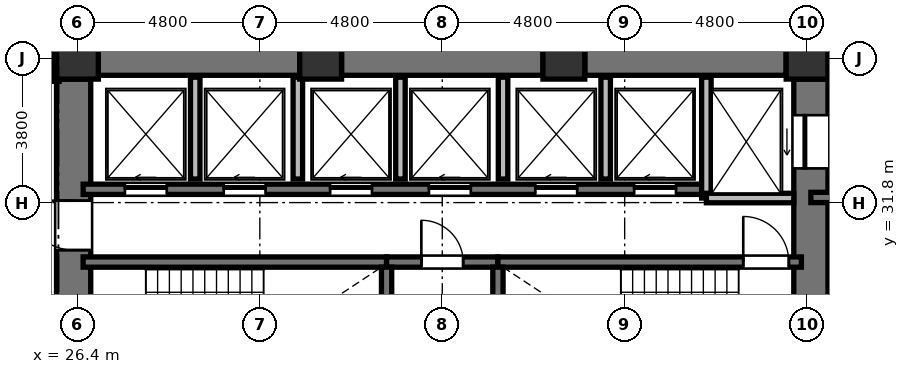
"""IFC4 building model, lengths in metres.
Left out: names, types, materials, properties, quantities, classifications, styles, units other than length and angle.
Written with IfcOpenShell. Run it as: python <this file> out.ifc"""

import sys

from ifc_helpers import new_model, si_unit, direction, frame, frame_2d, origin, origin_2d, place, context, subcontext, project, spatial, rectangle, extrude, element, fill, save


model = new_model("IFC4")
c1 = context("Model", 3, precision=1e-05, world=origin(), true_north=direction((0.0, 1.0)))
c2 = subcontext(c1, "Body", "Model", "MODEL_VIEW")
j1 = project(units=[si_unit("LENGTHUNIT", "METRE"), si_unit("PLANEANGLEUNIT", "RADIAN")], contexts=[c1])
p1 = place(None, origin())
s1 = spatial("IfcSite", under=j1, at=p1, CompositionType="ELEMENT")
p2 = place(p1, origin())
s2 = spatial("IfcBuilding", under=s1, at=p2, CompositionType="ELEMENT")
p3 = place(p2, frame((0.0, 0.0, 58.032)))
s3 = spatial("IfcBuildingStorey", under=s2, at=p3, CompositionType="ELEMENT", Elevation=58.032)
for number, where, z_axis, x_axis in (
    (1, (45.6, 35.6, 0.0), (0.0, 0.0, 1.0), (1.0, 0.0, 0.0)),
    (2, (39.2, 35.6, 0.0), (0.0, 0.0, 1.0), (1.0, 0.0, 0.0)),
    (3, (32.8, 35.6, 0.0), (0.0, 0.0, 1.0), (1.0, 0.0, 0.0)),
    (4, (26.4, 35.6, 0.0), (0.0, 0.0, 1.0), (1.0, 0.0, 0.0)),
):
    element("IfcColumn", number, at=place(p3, frame(where, z_axis=z_axis, x_axis=x_axis)), inside=s3, PredefinedType="COLUMN", context=c2, shape_type="SweptSolid", body=[
        extrude(rectangle(XDim=1.1, YDim=1.1, at=origin_2d()), origin(), (0.0, 0.0, 1.0), 3.648),
    ])
p4 = place(p3, frame((26.3, 20.95, 0.0), z_axis=(0.0, 0.0, 1.0), x_axis=(0.0, 1.0, 0.0)))
e5 = element("IfcWall", 5, at=p4, inside=s3, PredefinedType="SHEAR", context=c2, shape_type="SweptSolid", body=[
    extrude(rectangle(XDim=14.1, YDim=0.9, at=frame_2d((7.05, 0.0))), origin(), (0.0, 0.0, 1.0), 3.648),
])
p5 = place(p4, frame((6.5, 0.0, 0.0)))
e6 = element("IfcOpeningElement", 6, at=p5, cuts=e5, PredefinedType="OPENING", context=c2, shape_type="SweptSolid", body=[
    extrude(rectangle(XDim=1.2, YDim=2.15, at=frame_2d((0.6, 1.075))), frame((0.0, 0.46, 0.0), z_axis=(0.0, -1.0, 0.0), x_axis=(1.0, 0.0, 0.0)), (0.0, 0.0, 1.0), 0.92),
])
p6 = place(p4, frame((9.6, 0.0, 0.0)))
e7 = element("IfcOpeningElement", 7, at=p6, cuts=e5, PredefinedType="OPENING", context=c2, shape_type="SweptSolid", body=[
    extrude(rectangle(XDim=1.3, YDim=2.2, at=frame_2d((0.65, 1.1))), frame((0.0, 0.46, 0.0), z_axis=(0.0, -1.0, 0.0), x_axis=(1.0, 0.0, 0.0)), (0.0, 0.0, 1.0), 0.92),
])
p7 = place(p4, frame((3.26, 0.0, 0.0)))
e8 = element("IfcOpeningElement", 8, at=p7, cuts=e5, PredefinedType="OPENING", context=c2, shape_type="SweptSolid", body=[
    extrude(rectangle(XDim=1.3, YDim=2.2, at=frame_2d((0.65, 1.1))), frame((0.0, 0.46, 0.0), z_axis=(0.0, -1.0, 0.0), x_axis=(1.0, 0.0, 0.0)), (0.0, 0.0, 1.0), 0.92),
])
p8 = place(p3, frame((45.7, 20.95, 0.0), z_axis=(0.0, 0.0, 1.0), x_axis=(0.0, 1.0, 0.0)))
e9 = element("IfcWall", 9, at=p8, inside=s3, PredefinedType="SHEAR", context=c2, shape_type="SweptSolid", body=[
    extrude(rectangle(XDim=14.1, YDim=0.9, at=frame_2d((7.05, 0.0))), origin(), (0.0, 0.0, 1.0), 3.648),
])
p9 = place(p8, frame((11.75, 0.0, 0.0)))
e10 = element("IfcOpeningElement", 10, at=p9, cuts=e9, PredefinedType="OPENING", context=c2, shape_type="SweptSolid", body=[
    extrude(rectangle(XDim=1.4, YDim=2.3, at=frame_2d((0.7, 1.15))), frame((0.0, 0.46, 0.0), z_axis=(0.0, -1.0, 0.0), x_axis=(1.0, 0.0, 0.0)), (0.0, 0.0, 1.0), 0.92),
])
p10 = place(p8, frame((0.95, 0.0, 0.0)))
e11 = element("IfcOpeningElement", 11, at=p10, cuts=e9, PredefinedType="OPENING", context=c2, shape_type="SweptSolid", body=[
    extrude(rectangle(XDim=1.4, YDim=2.3, at=frame_2d((0.7, 1.15))), frame((0.0, 0.46, 0.0), z_axis=(0.0, -1.0, 0.0), x_axis=(1.0, 0.0, 0.0)), (0.0, 0.0, 1.0), 0.92),
])
p11 = place(p3, frame((26.95, 35.6, 0.0), z_axis=(0.0, 0.0, 1.0), x_axis=(1.0, 0.0, 0.0)))
e12 = element("IfcWall", 12, at=p11, inside=s3, PredefinedType="SHEAR", context=c2, shape_type="SweptSolid", body=[
    extrude(rectangle(XDim=5.3, YDim=0.9, at=frame_2d((2.65, 0.0))), origin(), (0.0, 0.0, 1.0), 3.648),
])
p12 = place(p3, frame((33.35, 35.6, 0.0), z_axis=(0.0, 0.0, 1.0), x_axis=(1.0, 0.0, 0.0)))
e13 = element("IfcWall", 13, at=p12, inside=s3, PredefinedType="SHEAR", context=c2, shape_type="SweptSolid", body=[
    extrude(rectangle(XDim=5.3, YDim=0.9, at=frame_2d((2.65, 0.0))), origin(), (0.0, 0.0, 1.0), 3.648),
])
p13 = place(p3, frame((39.75, 35.6, 0.0), z_axis=(0.0, 0.0, 1.0), x_axis=(1.0, 0.0, 0.0)))
e14 = element("IfcWall", 14, at=p13, inside=s3, PredefinedType="SHEAR", context=c2, shape_type="SweptSolid", body=[
    extrude(rectangle(XDim=5.3, YDim=0.9, at=frame_2d((2.65, 0.0))), origin(), (0.0, 0.0, 1.0), 3.648),
])
p14 = place(p3, frame((26.55, 30.235, 0.0), z_axis=(0.0, 0.0, 1.0), x_axis=(1.0, 0.0, 0.0)))
e15 = element("IfcWall", 15, at=p14, inside=s3, PredefinedType="SHEAR", context=c2, shape_type="SweptSolid", body=[
    extrude(rectangle(XDim=7.985, YDim=0.27, at=frame_2d((3.992, 0.0))), origin(), (0.0, 0.0, 1.0), 3.648),
])
p15 = place(p3, frame((34.535, 30.235, 0.0), z_axis=(0.0, 0.0, 1.0), x_axis=(1.0, 0.0, 0.0)))
e16 = element("IfcWall", 16, at=p15, inside=s3, PredefinedType="SHEAR", context=c2, shape_type="SweptSolid", body=[
    extrude(rectangle(XDim=2.93, YDim=0.27, at=frame_2d((1.465, 0.0))), origin(), (0.0, 0.0, 1.0), 3.648),
])
p16 = place(p15, frame((0.915, 0.0, 0.0)))
e17 = element("IfcOpeningElement", 17, at=p16, cuts=e16, PredefinedType="OPENING", context=c2, shape_type="SweptSolid", body=[
    extrude(rectangle(XDim=1.1, YDim=2.15, at=frame_2d((0.55, 1.075))), frame((0.0, 0.145, 0.0), z_axis=(0.0, -1.0, 0.0), x_axis=(1.0, 0.0, 0.0)), (0.0, 0.0, 1.0), 0.29),
])
p17 = place(p3, frame((37.465, 30.235, 0.0), z_axis=(0.0, 0.0, 1.0), x_axis=(1.0, 0.0, 0.0)))
e18 = element("IfcWall", 18, at=p17, inside=s3, PredefinedType="SHEAR", context=c2, shape_type="SweptSolid", body=[
    extrude(rectangle(XDim=7.985, YDim=0.27, at=frame_2d((3.992, 0.0))), origin(), (0.0, 0.0, 1.0), 3.648),
])
p18 = place(p17, frame((6.455, 0.0, 0.0)))
e19 = element("IfcOpeningElement", 19, at=p18, cuts=e18, PredefinedType="OPENING", context=c2, shape_type="SweptSolid", body=[
    extrude(rectangle(XDim=1.2, YDim=2.15, at=frame_2d((0.6, 1.075))), frame((0.0, 0.145, 0.0), z_axis=(0.0, -1.0, 0.0), x_axis=(1.0, 0.0, 0.0)), (0.0, 0.0, 1.0), 0.29),
])
for number, where, z_axis, x_axis in (
    (20, (34.535, 26.02, 0.0), (0.0, 0.0, 1.0), (0.0, 1.0, 0.0)),
    (21, (37.465, 26.02, 0.0), (0.0, 0.0, 1.0), (0.0, 1.0, 0.0)),
):
    element("IfcWall", number, at=place(p3, frame(where, z_axis=z_axis, x_axis=x_axis)), inside=s3, PredefinedType="SHEAR", context=c2, shape_type="SweptSolid", body=[
        extrude(rectangle(XDim=4.08, YDim=0.27, at=frame_2d((2.04, 0.0))), origin(), (0.0, 0.0, 1.0), 3.648),
    ])
p19 = place(p3, frame((26.55, 32.15, 0.0), z_axis=(0.0, 0.0, 1.0), x_axis=(1.0, 0.0, 0.0)))
e22 = element("IfcWall", 22, at=p19, inside=s3, PredefinedType="SHEAR", context=c2, shape_type="SweptSolid", body=[
    extrude(rectangle(XDim=16.4, YDim=0.27, at=frame_2d((8.2, 0.0))), origin(), (0.0, 0.0, 1.0), 3.648),
])
p20 = place(p19, frame((1.1, 0.0, 0.0)))
e23 = element("IfcOpeningElement", 23, at=p20, cuts=e22, PredefinedType="OPENING", context=c2, shape_type="SweptSolid", body=[
    extrude(rectangle(XDim=1.1, YDim=2.2, at=frame_2d((0.55, 1.1))), frame((0.0, 0.145, 0.0), z_axis=(0.0, -1.0, 0.0), x_axis=(1.0, 0.0, 0.0)), (0.0, 0.0, 1.0), 0.29),
])
p21 = place(p19, frame((3.7, 0.0, 0.0)))
e24 = element("IfcOpeningElement", 24, at=p21, cuts=e22, PredefinedType="OPENING", context=c2, shape_type="SweptSolid", body=[
    extrude(rectangle(XDim=1.1, YDim=2.2, at=frame_2d((0.55, 1.1))), frame((0.0, 0.145, 0.0), z_axis=(0.0, -1.0, 0.0), x_axis=(1.0, 0.0, 0.0)), (0.0, 0.0, 1.0), 0.29),
])
p22 = place(p19, frame((6.5, 0.0, 0.0)))
e25 = element("IfcOpeningElement", 25, at=p22, cuts=e22, PredefinedType="OPENING", context=c2, shape_type="SweptSolid", body=[
    extrude(rectangle(XDim=1.1, YDim=2.2, at=frame_2d((0.55, 1.1))), frame((0.0, 0.145, 0.0), z_axis=(0.0, -1.0, 0.0), x_axis=(1.0, 0.0, 0.0)), (0.0, 0.0, 1.0), 0.29),
])
p23 = place(p19, frame((9.1, 0.0, 0.0)))
e26 = element("IfcOpeningElement", 26, at=p23, cuts=e22, PredefinedType="OPENING", context=c2, shape_type="SweptSolid", body=[
    extrude(rectangle(XDim=1.1, YDim=2.2, at=frame_2d((0.55, 1.1))), frame((0.0, 0.145, 0.0), z_axis=(0.0, -1.0, 0.0), x_axis=(1.0, 0.0, 0.0)), (0.0, 0.0, 1.0), 0.29),
])
p24 = place(p19, frame((11.9, 0.0, 0.0)))
e27 = element("IfcOpeningElement", 27, at=p24, cuts=e22, PredefinedType="OPENING", context=c2, shape_type="SweptSolid", body=[
    extrude(rectangle(XDim=1.1, YDim=2.2, at=frame_2d((0.55, 1.1))), frame((0.0, 0.145, 0.0), z_axis=(0.0, -1.0, 0.0), x_axis=(1.0, 0.0, 0.0)), (0.0, 0.0, 1.0), 0.29),
])
p25 = place(p19, frame((14.5, 0.0, 0.0)))
e28 = element("IfcOpeningElement", 28, at=p25, cuts=e22, PredefinedType="OPENING", context=c2, shape_type="SweptSolid", body=[
    extrude(rectangle(XDim=1.1, YDim=2.2, at=frame_2d((0.55, 1.1))), frame((0.0, 0.145, 0.0), z_axis=(0.0, -1.0, 0.0), x_axis=(1.0, 0.0, 0.0)), (0.0, 0.0, 1.0), 0.29),
])
p26 = place(p3, frame((42.95, 31.92, 0.0), z_axis=(0.0, 0.0, 1.0), x_axis=(0.0, 1.0, 0.0)))
e29 = element("IfcWall", 29, at=p26, inside=s3, PredefinedType="SOLIDWALL", context=c2, shape_type="SweptSolid", body=[
    extrude(rectangle(XDim=3.18, YDim=0.25, at=frame_2d((1.59, 0.0))), origin(), (0.0, 0.0, 1.0), 3.428),
])
p27 = place(p3, frame((42.95, 31.92, 0.0), z_axis=(0.0, 0.0, 1.0), x_axis=(1.0, 0.0, 0.0)))
e30 = element("IfcWall", 30, at=p27, inside=s3, PredefinedType="SOLIDWALL", context=c2, shape_type="SweptSolid", body=[
    extrude(rectangle(XDim=2.3, YDim=0.25, at=frame_2d((1.15, 0.0))), origin(), (0.0, 0.0, 1.0), 3.428),
])
for number, where, z_axis, x_axis in (
    (31, (29.5, 32.42, 0.0), (0.0, 0.0, 1.0), (0.0, 1.0, 0.0)),
    (32, (32.2, 32.42, 0.0), (0.0, 0.0, 1.0), (0.0, 1.0, 0.0)),
    (33, (34.9, 32.42, 0.0), (0.0, 0.0, 1.0), (0.0, 1.0, 0.0)),
    (34, (37.6, 32.42, 0.0), (0.0, 0.0, 1.0), (0.0, 1.0, 0.0)),
    (35, (40.3, 32.42, 0.0), (0.0, 0.0, 1.0), (0.0, 1.0, 0.0)),
):
    element("IfcWall", number, at=place(p3, frame(where, z_axis=z_axis, x_axis=x_axis)), inside=s3, PredefinedType="SOLIDWALL", context=c2, shape_type="SweptSolid", body=[
        extrude(rectangle(XDim=2.68, YDim=0.25, at=frame_2d((1.34, 0.0))), origin(), (0.0, 0.0, 1.0), 3.428),
    ])
p28 = place(p3, frame((45.7, 31.935, 0.0), z_axis=(0.0, 0.0, 1.0), x_axis=(1.0, 0.0, 0.0)))
e36 = element("IfcWall", 36, at=p28, inside=s3, PredefinedType="SHEAR", context=c2, shape_type="SweptSolid", body=[
    extrude(rectangle(XDim=4.715, YDim=0.27, at=frame_2d((2.357, 0.0))), origin(), (0.0, 0.0, 1.0), 3.648),
])
p29 = place(p3, frame((25.83, 36.21, 0.0), z_axis=(0.0, 0.0, 1.0), x_axis=(0.0, -1.0, 0.0)))
e37 = element("IfcWall", 37, at=p29, inside=s3, PredefinedType="PARTITIONING", context=c2, shape_type="SweptSolid", body=[
    extrude(rectangle(XDim=1.22, YDim=0.18, at=frame_2d((0.61, 0.0))), origin(), (0.0, 0.0, 1.0), 3.428),
])
p30 = place(p18, origin())
e38 = element("IfcDoor", 38, at=p30, inside=s3, OperationType="SINGLE_SWING_LEFT", PredefinedType="DOOR", context=c2, shape_type="SweptSolid", body=[
    extrude(rectangle(XDim=1.2, YDim=2.15, at=frame_2d((0.6, 1.075))), frame((0.0, 0.025, 0.0), z_axis=(0.0, -1.0, 0.0), x_axis=(1.0, 0.0, 0.0)), (0.0, 0.0, 1.0), 0.05),
])
fill(e19, e38)
p31 = place(p16, origin())
e39 = element("IfcDoor", 39, at=p31, inside=s3, OperationType="SINGLE_SWING_LEFT", PredefinedType="DOOR", context=c2, shape_type="SweptSolid", body=[
    extrude(rectangle(XDim=1.1, YDim=2.15, at=frame_2d((0.55, 1.075))), frame((0.0, 0.025, 0.0), z_axis=(0.0, -1.0, 0.0), x_axis=(1.0, 0.0, 0.0)), (0.0, 0.0, 1.0), 0.05),
])
fill(e17, e39)
p32 = place(p6, origin())
e40 = element("IfcDoor", 40, at=p32, inside=s3, OperationType="SINGLE_SWING_RIGHT", PredefinedType="DOOR", context=c2, shape_type="SweptSolid", body=[
    extrude(rectangle(XDim=1.3, YDim=2.2, at=frame_2d((0.65, 1.1))), frame((0.0, 0.025, 0.0), z_axis=(0.0, -1.0, 0.0), x_axis=(1.0, 0.0, 0.0)), (0.0, 0.0, 1.0), 0.05),
])
fill(e7, e40)
p33 = place(p20, origin())
e41 = element("IfcDoor", 41, at=p33, inside=s3, OperationType="SLIDING_TO_LEFT", PredefinedType="DOOR", context=c2, shape_type="SweptSolid", body=[
    extrude(rectangle(XDim=1.1, YDim=2.2, at=frame_2d((0.55, 1.1))), frame((0.0, 0.025, 0.0), z_axis=(0.0, -1.0, 0.0), x_axis=(1.0, 0.0, 0.0)), (0.0, 0.0, 1.0), 0.05),
])
fill(e23, e41)
p34 = place(p21, origin())
e42 = element("IfcDoor", 42, at=p34, inside=s3, OperationType="SLIDING_TO_LEFT", PredefinedType="DOOR", context=c2, shape_type="SweptSolid", body=[
    extrude(rectangle(XDim=1.1, YDim=2.2, at=frame_2d((0.55, 1.1))), frame((0.0, 0.025, 0.0), z_axis=(0.0, -1.0, 0.0), x_axis=(1.0, 0.0, 0.0)), (0.0, 0.0, 1.0), 0.05),
])
fill(e24, e42)
p35 = place(p22, origin())
e43 = element("IfcDoor", 43, at=p35, inside=s3, OperationType="SLIDING_TO_LEFT", PredefinedType="DOOR", context=c2, shape_type="SweptSolid", body=[
    extrude(rectangle(XDim=1.1, YDim=2.2, at=frame_2d((0.55, 1.1))), frame((0.0, 0.025, 0.0), z_axis=(0.0, -1.0, 0.0), x_axis=(1.0, 0.0, 0.0)), (0.0, 0.0, 1.0), 0.05),
])
fill(e25, e43)
p36 = place(p23, origin())
e44 = element("IfcDoor", 44, at=p36, inside=s3, OperationType="SLIDING_TO_LEFT", PredefinedType="DOOR", context=c2, shape_type="SweptSolid", body=[
    extrude(rectangle(XDim=1.1, YDim=2.2, at=frame_2d((0.55, 1.1))), frame((0.0, 0.025, 0.0), z_axis=(0.0, -1.0, 0.0), x_axis=(1.0, 0.0, 0.0)), (0.0, 0.0, 1.0), 0.05),
])
fill(e26, e44)
p37 = place(p24, origin())
e45 = element("IfcDoor", 45, at=p37, inside=s3, OperationType="SLIDING_TO_LEFT", PredefinedType="DOOR", context=c2, shape_type="SweptSolid", body=[
    extrude(rectangle(XDim=1.1, YDim=2.2, at=frame_2d((0.55, 1.1))), frame((0.0, 0.025, 0.0), z_axis=(0.0, -1.0, 0.0), x_axis=(1.0, 0.0, 0.0)), (0.0, 0.0, 1.0), 0.05),
])
fill(e27, e45)
p38 = place(p25, origin())
e46 = element("IfcDoor", 46, at=p38, inside=s3, OperationType="SLIDING_TO_LEFT", PredefinedType="DOOR", context=c2, shape_type="SweptSolid", body=[
    extrude(rectangle(XDim=1.1, YDim=2.2, at=frame_2d((0.55, 1.1))), frame((0.0, 0.025, 0.0), z_axis=(0.0, -1.0, 0.0), x_axis=(1.0, 0.0, 0.0)), (0.0, 0.0, 1.0), 0.05),
])
fill(e28, e46)
p39 = place(p9, origin())
e47 = element("IfcDoor", 47, at=p39, inside=s3, OperationType="SLIDING_TO_LEFT", PredefinedType="DOOR", context=c2, shape_type="SweptSolid", body=[
    extrude(rectangle(XDim=1.4, YDim=2.3, at=frame_2d((0.7, 1.15))), frame((0.0, 0.025, 0.0), z_axis=(0.0, -1.0, 0.0), x_axis=(1.0, 0.0, 0.0)), (0.0, 0.0, 1.0), 0.05),
])
fill(e10, e47)
save(model, sys.argv[1])
